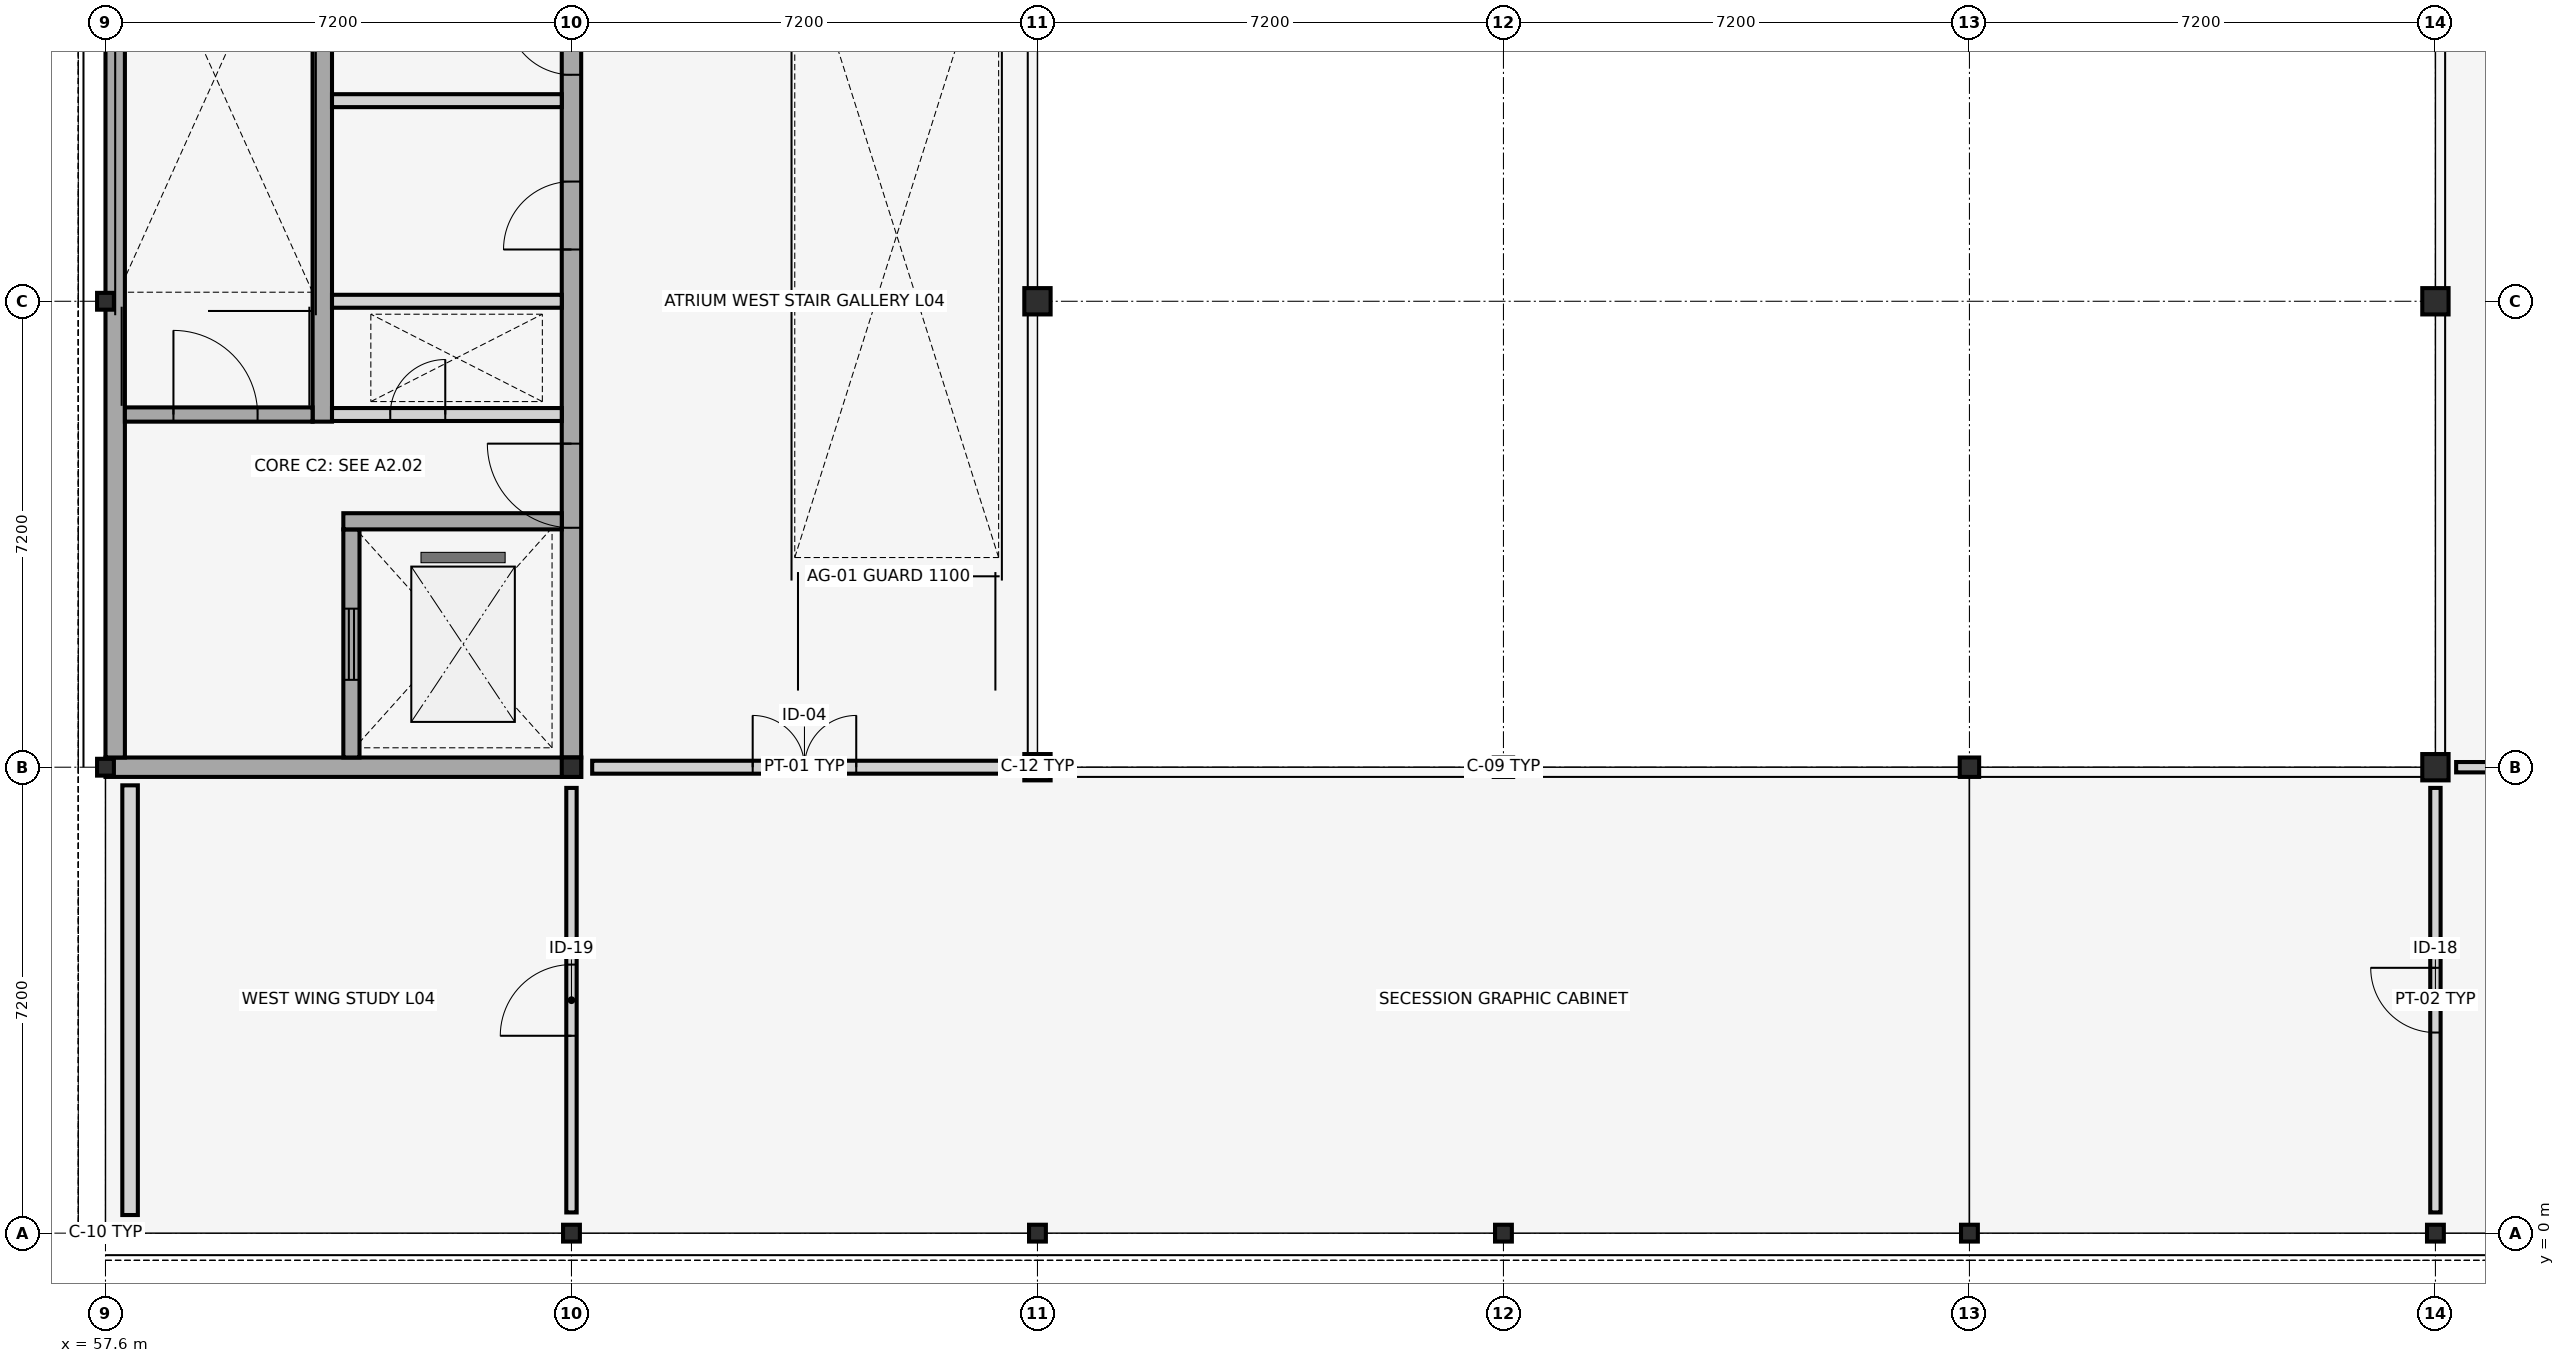
"""IFC4 building model, lengths in metres.
Left out: names, types, materials, properties, quantities, classifications, styles, units other than length and angle.
Written with IfcOpenShell. Run it as: python <this file> out.ifc"""

import sys

from ifc_helpers import new_model, si_unit, direction, frame, frame_2d, origin, origin_2d, place, context, subcontext, project, spatial, rectangle, hollow_circle, i_section, extrude, element, fill, save


model = new_model("IFC4")
c1 = context("Model", 3, precision=1e-05, world=origin(), true_north=direction((0.0, 1.0)))
c2 = subcontext(c1, "Body", "Model", "MODEL_VIEW")
j1 = project(units=[si_unit("LENGTHUNIT", "METRE"), si_unit("PLANEANGLEUNIT", "RADIAN")], contexts=[c1])
p1 = place(None, origin())
s1 = spatial("IfcSite", under=j1, at=p1, CompositionType="ELEMENT")
p2 = place(p1, origin())
s2 = spatial("IfcBuilding", under=s1, at=p2, CompositionType="ELEMENT")
p3 = place(p2, frame((0.0, 0.0, 17.1)))
s3 = spatial("IfcBuildingStorey", under=s2, at=p3, CompositionType="ELEMENT", Elevation=17.1)
for number, where, z_axis, x_axis in (
    (1, (57.6, 0.0, 0.0), (0.0, 0.0, 1.0), (1.0, 0.0, 0.0)),
    (2, (57.6, 7.2, 0.0), (0.0, 0.0, 1.0), (0.0, 1.0, 0.0)),
    (3, (57.6, 14.4, 0.0), (0.0, 0.0, 1.0), (1.0, 0.0, 0.0)),
    (4, (64.8, 0.0, 0.0), (0.0, 0.0, 1.0), (0.0, 1.0, 0.0)),
):
    element("IfcColumn", number, at=place(p3, frame(where, z_axis=z_axis, x_axis=x_axis)), inside=s3, PredefinedType="COLUMN", context=c2, shape_type="SweptSolid", body=[
        extrude(i_section(OverallWidth=0.26, OverallDepth=0.26, WebThickness=0.01, FlangeThickness=0.018, FilletRadius=0.024, at=origin_2d()), origin(), (0.0, 0.0, 1.0), 8.1),
    ])
p4 = place(p3, frame((64.8, 7.2, 0.0), z_axis=(0.0, 0.0, 1.0), x_axis=(1.0, 0.0, 0.0)))
e5 = element("IfcColumn", 5, at=p4, inside=s3, PredefinedType="COLUMN", context=c2, shape_type="SweptSolid", body=[
    extrude(i_section(OverallWidth=0.3, OverallDepth=0.3, WebThickness=0.011, FlangeThickness=0.019, FilletRadius=0.027, at=origin_2d()), origin(), (0.0, 0.0, 1.0), 8.1),
])
p5 = place(p3, frame((72.0, 0.0, 0.0), z_axis=(0.0, 0.0, 1.0), x_axis=(1.0, 0.0, 0.0)))
e6 = element("IfcColumn", 6, at=p5, inside=s3, PredefinedType="COLUMN", context=c2, shape_type="SweptSolid", body=[
    extrude(i_section(OverallWidth=0.26, OverallDepth=0.26, WebThickness=0.01, FlangeThickness=0.018, FilletRadius=0.024, at=origin_2d()), origin(), (0.0, 0.0, 1.0), 8.1),
])
for number, where, z_axis, x_axis in (
    (7, (72.0, 7.2, 0.0), (0.0, 0.0, 1.0), (0.0, 1.0, 0.0)),
    (8, (72.0, 14.4, 0.0), (0.0, 0.0, 1.0), (1.0, 0.0, 0.0)),
):
    element("IfcColumn", number, at=place(p3, frame(where, z_axis=z_axis, x_axis=x_axis)), inside=s3, PredefinedType="COLUMN", context=c2, shape_type="SweptSolid", body=[
        extrude(hollow_circle(Radius=0.203, WallThickness=0.016, at=origin_2d()), origin(), (0.0, 0.0, 1.0), 8.1),
    ])
p6 = place(p3, frame((79.2, 0.0, 0.0), z_axis=(0.0, 0.0, 1.0), x_axis=(0.0, 1.0, 0.0)))
e9 = element("IfcColumn", 9, at=p6, inside=s3, PredefinedType="COLUMN", context=c2, shape_type="SweptSolid", body=[
    extrude(i_section(OverallWidth=0.26, OverallDepth=0.26, WebThickness=0.01, FlangeThickness=0.018, FilletRadius=0.024, at=origin_2d()), origin(), (0.0, 0.0, 1.0), 8.1),
])
p7 = place(p3, frame((79.2, 7.2, 0.0), z_axis=(0.0, 0.0, 1.0), x_axis=(1.0, 0.0, 0.0)))
e10 = element("IfcColumn", 10, at=p7, inside=s3, PredefinedType="COLUMN", context=c2, shape_type="SweptSolid", body=[
    extrude(i_section(OverallWidth=0.3, OverallDepth=0.3, WebThickness=0.011, FlangeThickness=0.019, FilletRadius=0.027, at=origin_2d()), origin(), (0.0, 0.0, 1.0), 8.1),
])
p8 = place(p3, frame((86.4, 0.0, 0.0), z_axis=(0.0, 0.0, 1.0), x_axis=(1.0, 0.0, 0.0)))
e11 = element("IfcColumn", 11, at=p8, inside=s3, PredefinedType="COLUMN", context=c2, shape_type="SweptSolid", body=[
    extrude(i_section(OverallWidth=0.26, OverallDepth=0.26, WebThickness=0.01, FlangeThickness=0.018, FilletRadius=0.024, at=origin_2d()), origin(), (0.0, 0.0, 1.0), 8.1),
])
p9 = place(p3, frame((86.4, 7.2, 0.0), z_axis=(0.0, 0.0, 1.0), x_axis=(0.0, 1.0, 0.0)))
e12 = element("IfcColumn", 12, at=p9, inside=s3, PredefinedType="COLUMN", context=c2, shape_type="SweptSolid", body=[
    extrude(i_section(OverallWidth=0.3, OverallDepth=0.3, WebThickness=0.011, FlangeThickness=0.019, FilletRadius=0.027, at=origin_2d()), origin(), (0.0, 0.0, 1.0), 8.1),
])
p10 = place(p3, frame((93.6, 0.0, 0.0), z_axis=(0.0, 0.0, 1.0), x_axis=(0.0, 1.0, 0.0)))
e13 = element("IfcColumn", 13, at=p10, inside=s3, PredefinedType="COLUMN", context=c2, shape_type="SweptSolid", body=[
    extrude(i_section(OverallWidth=0.26, OverallDepth=0.26, WebThickness=0.01, FlangeThickness=0.018, FilletRadius=0.024, at=origin_2d()), origin(), (0.0, 0.0, 1.0), 8.1),
])
for number, where, z_axis, x_axis in (
    (14, (93.6, 7.2, 0.0), (0.0, 0.0, 1.0), (1.0, 0.0, 0.0)),
    (15, (93.6, 14.4, 0.0), (0.0, 0.0, 1.0), (0.0, 1.0, 0.0)),
):
    element("IfcColumn", number, at=place(p3, frame(where, z_axis=z_axis, x_axis=x_axis)), inside=s3, PredefinedType="COLUMN", context=c2, shape_type="SweptSolid", body=[
        extrude(hollow_circle(Radius=0.203, WallThickness=0.016, at=origin_2d()), origin(), (0.0, 0.0, 1.0), 8.1),
    ])
p11 = place(p3, frame((57.98, 6.92, 0.0), z_axis=(0.0, 0.0, 1.0), x_axis=(0.0, -1.0, 0.0)))
e16 = element("IfcWall", 16, at=p11, inside=s3, PredefinedType="STANDARD", context=c2, shape_type="SweptSolid", body=[
    extrude(rectangle(XDim=6.64, YDim=0.24, at=frame_2d((3.32, 0.0))), origin(), (0.0, 0.0, 1.0), 7.48),
])
p12 = place(p3, frame((57.6, 7.2, 0.0), z_axis=(0.0, 0.0, 1.0), x_axis=(1.0, 0.0, 0.0)))
e17 = element("IfcWall", 17, at=p12, inside=s3, PredefinedType="SHEAR", context=c2, shape_type="SweptSolid", body=[
    extrude(rectangle(XDim=7.35, YDim=0.3, at=frame_2d((3.675, 0.0))), origin(), (0.0, 0.0, 1.0), 7.88),
])
p13 = place(p3, frame((57.75, 7.35, 0.0), z_axis=(0.0, 0.0, 1.0), x_axis=(0.0, 1.0, 0.0)))
e18 = element("IfcWall", 18, at=p13, inside=s3, PredefinedType="SHEAR", context=c2, shape_type="SweptSolid", body=[
    extrude(rectangle(XDim=14.1, YDim=0.3, at=frame_2d((7.05, 0.0))), origin(), (0.0, 0.0, 1.0), 7.88),
])
p14 = place(p3, frame((64.8, 7.35, 0.0), z_axis=(0.0, 0.0, 1.0), x_axis=(0.0, 1.0, 0.0)))
e19 = element("IfcWall", 19, at=p14, inside=s3, PredefinedType="SHEAR", context=c2, shape_type="SweptSolid", body=[
    extrude(rectangle(XDim=14.1, YDim=0.3, at=frame_2d((7.05, 0.0))), origin(), (0.0, 0.0, 1.0), 7.88),
])
p15 = place(p14, frame((3.55, 0.0, 0.0)))
e20 = element("IfcOpeningElement", 20, at=p15, cuts=e19, PredefinedType="OPENING", context=c2, shape_type="SweptSolid", body=[
    extrude(rectangle(XDim=1.3, YDim=2.2, at=frame_2d((0.65, 1.1))), frame((0.0, 0.16, 0.0), z_axis=(0.0, -1.0, 0.0), x_axis=(1.0, 0.0, 0.0)), (0.0, 0.0, 1.0), 0.32),
])
p16 = place(p14, frame((7.85, 0.0, 0.0)))
e21 = element("IfcOpeningElement", 21, at=p16, cuts=e19, PredefinedType="OPENING", context=c2, shape_type="SweptSolid", body=[
    extrude(rectangle(XDim=1.05, YDim=2.15, at=frame_2d((0.525, 1.075))), frame((0.0, 0.16, 0.0), z_axis=(0.0, -1.0, 0.0), x_axis=(1.0, 0.0, 0.0)), (0.0, 0.0, 1.0), 0.32),
])
p17 = place(p14, frame((10.55, 0.0, 0.0)))
e22 = element("IfcOpeningElement", 22, at=p17, cuts=e19, PredefinedType="OPENING", context=c2, shape_type="SweptSolid", body=[
    extrude(rectangle(XDim=1.0, YDim=2.15, at=frame_2d((0.5, 1.075))), frame((0.0, 0.16, 0.0), z_axis=(0.0, -1.0, 0.0), x_axis=(1.0, 0.0, 0.0)), (0.0, 0.0, 1.0), 0.32),
])
p18 = place(p3, frame((61.4, 7.35, 0.0), z_axis=(0.0, 0.0, 1.0), x_axis=(0.0, 1.0, 0.0)))
e23 = element("IfcWall", 23, at=p18, inside=s3, PredefinedType="SHEAR", context=c2, shape_type="SweptSolid", body=[
    extrude(rectangle(XDim=3.525, YDim=0.25, at=frame_2d((1.762, 0.0))), origin(), (0.0, 0.0, 1.0), 7.88),
])
p19 = place(p18, frame((1.2, 0.0, 0.0)))
e24 = element("IfcOpeningElement", 24, at=p19, cuts=e23, PredefinedType="OPENING", context=c2, shape_type="SweptSolid", body=[
    extrude(rectangle(XDim=1.1, YDim=2.15, at=frame_2d((0.55, 1.075))), frame((0.0, 0.135, 0.0), z_axis=(0.0, -1.0, 0.0), x_axis=(1.0, 0.0, 0.0)), (0.0, 0.0, 1.0), 0.27),
])
p20 = place(p3, frame((60.95, 12.54, 0.0), z_axis=(0.0, 0.0, 1.0), x_axis=(0.0, 1.0, 0.0)))
e25 = element("IfcWall", 25, at=p20, inside=s3, PredefinedType="SHEAR", context=c2, shape_type="SweptSolid", body=[
    extrude(rectangle(XDim=8.91, YDim=0.3, at=frame_2d((4.455, 0.0))), origin(), (0.0, 0.0, 1.0), 7.88),
])
p21 = place(p3, frame((61.1, 12.65, 0.0), z_axis=(0.0, 0.0, 1.0), x_axis=(1.0, 0.0, 0.0)))
e26 = element("IfcWall", 26, at=p21, inside=s3, PredefinedType="PLUMBINGWALL", context=c2, shape_type="SweptSolid", body=[
    extrude(rectangle(XDim=3.55, YDim=0.2, at=frame_2d((1.775, 0.0))), origin(), (0.0, 0.0, 1.0), 7.3),
])
p22 = place(p21, frame((0.9, 0.0, 0.0)))
e27 = element("IfcOpeningElement", 27, at=p22, cuts=e26, PredefinedType="OPENING", context=c2, shape_type="SweptSolid", body=[
    extrude(rectangle(XDim=0.85, YDim=2.05, at=frame_2d((0.425, 1.025))), frame((0.0, 0.11, 0.0), z_axis=(0.0, -1.0, 0.0), x_axis=(1.0, 0.0, 0.0)), (0.0, 0.0, 1.0), 0.22),
])
p23 = place(p3, frame((57.9, 12.65, 0.0), z_axis=(0.0, 0.0, 1.0), x_axis=(1.0, 0.0, 0.0)))
e28 = element("IfcWall", 28, at=p23, inside=s3, PredefinedType="SHEAR", context=c2, shape_type="SweptSolid", body=[
    extrude(rectangle(XDim=2.9, YDim=0.22, at=frame_2d((1.45, 0.0))), origin(), (0.0, 0.0, 1.0), 7.88),
])
p24 = place(p23, frame((0.75, 0.0, 0.0)))
e29 = element("IfcOpeningElement", 29, at=p24, cuts=e28, PredefinedType="OPENING", context=c2, shape_type="SweptSolid", body=[
    extrude(rectangle(XDim=1.3, YDim=2.2, at=frame_2d((0.65, 1.1))), frame((0.0, 0.12, 0.0), z_axis=(0.0, -1.0, 0.0), x_axis=(1.0, 0.0, 0.0)), (0.0, 0.0, 1.0), 0.24),
])
p25 = place(p3, frame((61.275, 11.0, 0.0), z_axis=(0.0, 0.0, 1.0), x_axis=(1.0, 0.0, 0.0)))
e30 = element("IfcWall", 30, at=p25, inside=s3, PredefinedType="SHEAR", context=c2, shape_type="SweptSolid", body=[
    extrude(rectangle(XDim=3.375, YDim=0.25, at=frame_2d((1.688, 0.0))), origin(), (0.0, 0.0, 1.0), 7.88),
])
for number, where, z_axis, x_axis in (
    (31, (61.1, 14.4, 0.0), (0.0, 0.0, 1.0), (1.0, 0.0, 0.0)),
    (32, (61.1, 17.5, 0.0), (0.0, 0.0, 1.0), (1.0, 0.0, 0.0)),
):
    element("IfcWall", number, at=place(p3, frame(where, z_axis=z_axis, x_axis=x_axis)), inside=s3, PredefinedType="PLUMBINGWALL", context=c2, shape_type="SweptSolid", body=[
        extrude(rectangle(XDim=3.55, YDim=0.2, at=frame_2d((1.775, 0.0))), origin(), (0.0, 0.0, 1.0), 7.3),
    ])
p26 = place(p3, frame((65.12, 7.2, 0.0), z_axis=(0.0, 0.0, 1.0), x_axis=(1.0, 0.0, 0.0)))
e33 = element("IfcWall", 33, at=p26, inside=s3, PredefinedType="PARTITIONING", context=c2, shape_type="SweptSolid", body=[
    extrude(rectangle(XDim=6.56, YDim=0.2, at=frame_2d((3.28, 0.0))), origin(), (0.0, 0.0, 1.0), 7.05),
])
p27 = place(p26, frame((2.48, 0.0, 0.0)))
e34 = element("IfcOpeningElement", 34, at=p27, cuts=e33, PredefinedType="OPENING", context=c2, shape_type="SweptSolid", body=[
    extrude(rectangle(XDim=1.6, YDim=2.35, at=frame_2d((0.8, 1.175))), frame((0.0, 0.11, 0.0), z_axis=(0.0, -1.0, 0.0), x_axis=(1.0, 0.0, 0.0)), (0.0, 0.0, 1.0), 0.22),
])
p28 = place(p3, frame((93.6, 0.32, 0.0), z_axis=(0.0, 0.0, 1.0), x_axis=(0.0, 1.0, 0.0)))
e35 = element("IfcWall", 35, at=p28, inside=s3, PredefinedType="PARTITIONING", context=c2, shape_type="SweptSolid", body=[
    extrude(rectangle(XDim=6.56, YDim=0.16, at=frame_2d((3.28, 0.0))), origin(), (0.0, 0.0, 1.0), 7.05),
])
p29 = place(p28, frame((2.78, 0.0, 0.0)))
e36 = element("IfcOpeningElement", 36, at=p29, cuts=e35, PredefinedType="OPENING", context=c2, shape_type="SweptSolid", body=[
    extrude(rectangle(XDim=1.0, YDim=2.25, at=frame_2d((0.5, 1.125))), frame((0.0, 0.09, 0.0), z_axis=(0.0, -1.0, 0.0), x_axis=(1.0, 0.0, 0.0)), (0.0, 0.0, 1.0), 0.18),
])
p30 = place(p3, frame((64.8, 0.32, 0.0), z_axis=(0.0, 0.0, 1.0), x_axis=(0.0, 1.0, 0.0)))
e37 = element("IfcWall", 37, at=p30, inside=s3, PredefinedType="PARTITIONING", context=c2, shape_type="SweptSolid", body=[
    extrude(rectangle(XDim=6.56, YDim=0.16, at=frame_2d((3.28, 0.0))), origin(), (0.0, 0.0, 1.0), 7.05),
])
p31 = place(p30, frame((2.73, 0.0, 0.0)))
e38 = element("IfcOpeningElement", 38, at=p31, cuts=e37, PredefinedType="OPENING", context=c2, shape_type="SweptSolid", body=[
    extrude(rectangle(XDim=1.1, YDim=2.35, at=frame_2d((0.55, 1.175))), frame((0.0, 0.09, 0.0), z_axis=(0.0, -1.0, 0.0), x_axis=(1.0, 0.0, 0.0)), (0.0, 0.0, 1.0), 0.18),
])
p32 = place(p3, frame((93.92, 7.2, 0.0), z_axis=(0.0, 0.0, 1.0), x_axis=(1.0, 0.0, 0.0)))
e39 = element("IfcWall", 39, at=p32, inside=s3, PredefinedType="PARTITIONING", context=c2, shape_type="SweptSolid", body=[
    extrude(rectangle(XDim=6.56, YDim=0.16, at=frame_2d((3.28, 0.0))), origin(), (0.0, 0.0, 1.0), 7.05),
])
p33 = place(p32, frame((2.53, 0.0, 0.0)))
e40 = element("IfcOpeningElement", 40, at=p33, cuts=e39, PredefinedType="OPENING", context=c2, shape_type="SweptSolid", body=[
    extrude(rectangle(XDim=1.5, YDim=2.5, at=frame_2d((0.75, 1.25))), frame((0.0, 0.09, 0.0), z_axis=(0.0, -1.0, 0.0), x_axis=(1.0, 0.0, 0.0)), (0.0, 0.0, 1.0), 0.18),
])
p34 = place(p15, origin())
e41 = element("IfcDoor", 41, at=p34, inside=s3, OperationType="SINGLE_SWING_RIGHT", PredefinedType="DOOR", context=c2, shape_type="SweptSolid", body=[
    extrude(rectangle(XDim=1.3, YDim=2.2, at=frame_2d((0.65, 1.1))), frame((0.0, 0.025, 0.0), z_axis=(0.0, -1.0, 0.0), x_axis=(1.0, 0.0, 0.0)), (0.0, 0.0, 1.0), 0.05),
])
fill(e20, e41)
p35 = place(p16, origin())
e42 = element("IfcDoor", 42, at=p35, inside=s3, OperationType="SINGLE_SWING_LEFT", PredefinedType="DOOR", context=c2, shape_type="SweptSolid", body=[
    extrude(rectangle(XDim=1.05, YDim=2.15, at=frame_2d((0.525, 1.075))), frame((0.0, 0.025, 0.0), z_axis=(0.0, -1.0, 0.0), x_axis=(1.0, 0.0, 0.0)), (0.0, 0.0, 1.0), 0.05),
])
fill(e21, e42)
p36 = place(p17, origin())
e43 = element("IfcDoor", 43, at=p36, inside=s3, OperationType="SINGLE_SWING_RIGHT", PredefinedType="DOOR", context=c2, shape_type="SweptSolid", body=[
    extrude(rectangle(XDim=1.0, YDim=2.15, at=frame_2d((0.5, 1.075))), frame((0.0, 0.025, 0.0), z_axis=(0.0, -1.0, 0.0), x_axis=(1.0, 0.0, 0.0)), (0.0, 0.0, 1.0), 0.05),
])
fill(e22, e43)
p37 = place(p19, origin())
e44 = element("IfcDoor", 44, at=p37, inside=s3, OperationType="SLIDING_TO_LEFT", PredefinedType="DOOR", context=c2, shape_type="SweptSolid", body=[
    extrude(rectangle(XDim=1.1, YDim=2.15, at=frame_2d((0.55, 1.075))), frame((0.0, 0.025, 0.0), z_axis=(0.0, -1.0, 0.0), x_axis=(1.0, 0.0, 0.0)), (0.0, 0.0, 1.0), 0.05),
])
fill(e24, e44)
p38 = place(p22, origin())
e45 = element("IfcDoor", 45, at=p38, inside=s3, OperationType="SINGLE_SWING_RIGHT", PredefinedType="TRAPDOOR", context=c2, shape_type="SweptSolid", body=[
    extrude(rectangle(XDim=0.85, YDim=2.05, at=frame_2d((0.425, 1.025))), frame((0.0, 0.025, 0.0), z_axis=(0.0, -1.0, 0.0), x_axis=(1.0, 0.0, 0.0)), (0.0, 0.0, 1.0), 0.05),
])
fill(e27, e45)
p39 = place(p24, origin())
e46 = element("IfcDoor", 46, at=p39, inside=s3, OperationType="SINGLE_SWING_LEFT", PredefinedType="DOOR", context=c2, shape_type="SweptSolid", body=[
    extrude(rectangle(XDim=1.3, YDim=2.2, at=frame_2d((0.65, 1.1))), frame((0.0, 0.025, 0.0), z_axis=(0.0, -1.0, 0.0), x_axis=(1.0, 0.0, 0.0)), (0.0, 0.0, 1.0), 0.05),
])
fill(e29, e46)
p40 = place(p27, origin())
e47 = element("IfcDoor", 47, at=p40, inside=s3, OperationType="DOUBLE_DOOR_SINGLE_SWING", PredefinedType="DOOR", context=c2, shape_type="SweptSolid", body=[
    extrude(rectangle(XDim=1.6, YDim=2.35, at=frame_2d((0.8, 1.175))), frame((0.0, 0.025, 0.0), z_axis=(0.0, -1.0, 0.0), x_axis=(1.0, 0.0, 0.0)), (0.0, 0.0, 1.0), 0.05),
])
fill(e34, e47)
p41 = place(p29, origin())
e48 = element("IfcDoor", 48, at=p41, inside=s3, OperationType="SINGLE_SWING_RIGHT", PredefinedType="DOOR", context=c2, shape_type="SweptSolid", body=[
    extrude(rectangle(XDim=1.0, YDim=2.25, at=frame_2d((0.5, 1.125))), frame((0.0, 0.025, 0.0), z_axis=(0.0, -1.0, 0.0), x_axis=(1.0, 0.0, 0.0)), (0.0, 0.0, 1.0), 0.05),
])
fill(e36, e48)
p42 = place(p31, origin())
e49 = element("IfcDoor", 49, at=p42, inside=s3, OperationType="SINGLE_SWING_LEFT", PredefinedType="DOOR", context=c2, shape_type="SweptSolid", body=[
    extrude(rectangle(XDim=1.1, YDim=2.35, at=frame_2d((0.55, 1.175))), frame((0.0, 0.025, 0.0), z_axis=(0.0, -1.0, 0.0), x_axis=(1.0, 0.0, 0.0)), (0.0, 0.0, 1.0), 0.05),
])
fill(e38, e49)
save(model, sys.argv[1])
